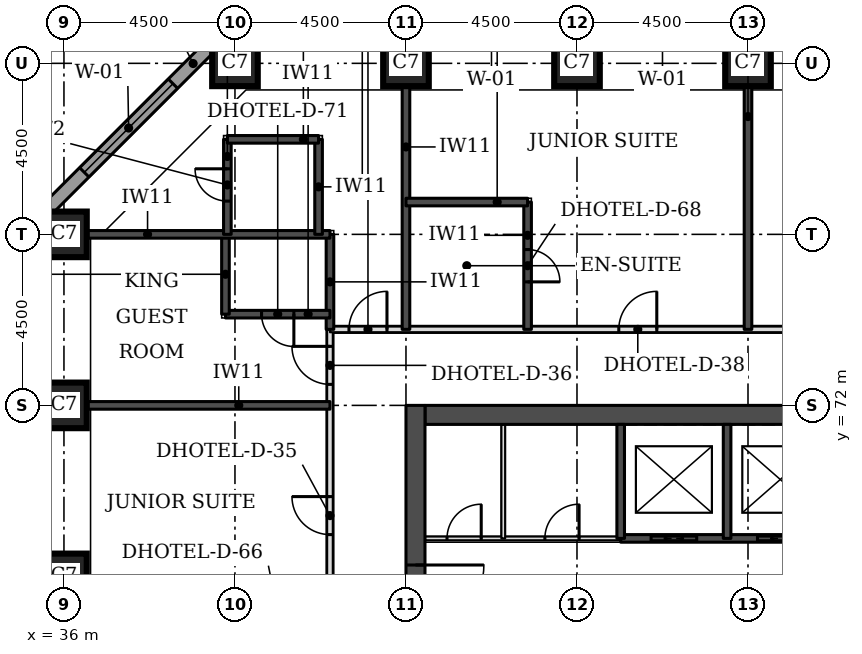
"""IFC4 building model, lengths in metres.
Left out: names, types, materials, properties, quantities, classifications, styles, units other than length and angle.
Written with IfcOpenShell. Run it as: python <this file> out.ifc"""

import sys

from ifc_helpers import new_model, si_unit, direction, frame, frame_2d, origin, origin_2d, place, context, subcontext, project, spatial, rectangle, extrude, element, fill, save


model = new_model("IFC4")
c1 = context("Model", 3, precision=1e-05, world=origin(), true_north=direction((0.0, 1.0)))
c2 = subcontext(c1, "Body", "Model", "MODEL_VIEW")
j1 = project(units=[si_unit("LENGTHUNIT", "METRE"), si_unit("PLANEANGLEUNIT", "RADIAN")], contexts=[c1])
p1 = place(None, origin())
s1 = spatial("IfcSite", under=j1, at=p1, CompositionType="ELEMENT")
p2 = place(p1, origin())
s2 = spatial("IfcBuilding", under=s1, at=p2, CompositionType="ELEMENT")
p3 = place(p2, frame((0.0, 0.0, 36.3)))
s3 = spatial("IfcBuildingStorey", under=s2, at=p3, CompositionType="ELEMENT", Elevation=36.3)
for number, where, z_axis, x_axis in (
    (1, (36.0, 67.5, 0.0), (0.0, 0.0, 1.0), (1.0, 0.0, 0.0)),
    (2, (36.0, 72.0, 0.0), (0.0, 0.0, 1.0), (1.0, 0.0, 0.0)),
    (3, (36.0, 76.5, 0.0), (0.0, 0.0, 1.0), (1.0, 0.0, 0.0)),
    (4, (40.5, 81.0, 0.0), (0.0, 0.0, 1.0), (1.0, 0.0, 0.0)),
    (5, (45.0, 81.0, 0.0), (0.0, 0.0, 1.0), (1.0, 0.0, 0.0)),
    (6, (49.5, 81.0, 0.0), (0.0, 0.0, 1.0), (1.0, 0.0, 0.0)),
    (7, (54.0, 81.0, 0.0), (0.0, 0.0, 1.0), (1.0, 0.0, 0.0)),
):
    element("IfcColumn", number, at=place(p3, frame(where, z_axis=z_axis, x_axis=x_axis)), inside=s3, PredefinedType="COLUMN", context=c2, shape_type="SweptSolid", body=[
        extrude(rectangle(XDim=1.2, YDim=1.2, at=origin_2d()), origin(), (0.0, 0.0, 1.0), 3.3),
    ])
p4 = place(p3, frame((45.5, 71.75, 0.0), z_axis=(0.0, 0.0, 1.0), x_axis=(1.0, 0.0, 0.0)))
e8 = element("IfcWall", 8, at=p4, inside=s3, PredefinedType="SHEAR", context=c2, shape_type="SweptSolid", body=[
    extrude(rectangle(XDim=21.5, YDim=0.5, at=frame_2d((10.75, 0.0))), origin(), (0.0, 0.0, 1.0), 3.3),
])
p5 = place(p3, frame((45.25, 49.5, 0.0), z_axis=(0.0, 0.0, 1.0), x_axis=(0.0, 1.0, 0.0)))
e9 = element("IfcWall", 9, at=p5, inside=s3, PredefinedType="SHEAR", context=c2, shape_type="SweptSolid", body=[
    extrude(rectangle(XDim=22.5, YDim=0.5, at=frame_2d((11.25, 0.0))), origin(), (0.0, 0.0, 1.0), 3.3),
])
p6 = place(p5, frame((4.2, 0.0, 0.0)))
e10 = element("IfcOpeningElement", 10, at=p6, cuts=e9, PredefinedType="OPENING", context=c2, shape_type="SweptSolid", body=[
    extrude(rectangle(XDim=1.8, YDim=2.1, at=frame_2d((0.9, 1.05))), frame((0.0, 0.26, 0.0), z_axis=(0.0, -1.0, 0.0), x_axis=(1.0, 0.0, 0.0)), (0.0, 0.0, 1.0), 0.52),
])
p7 = place(p5, frame((6.9, 0.0, 0.0)))
e11 = element("IfcOpeningElement", 11, at=p7, cuts=e9, PredefinedType="OPENING", context=c2, shape_type="SweptSolid", body=[
    extrude(rectangle(XDim=1.1, YDim=2.1, at=frame_2d((0.55, 1.05))), frame((0.0, 0.26, 0.0), z_axis=(0.0, -1.0, 0.0), x_axis=(1.0, 0.0, 0.0)), (0.0, 0.0, 1.0), 0.52),
])
p8 = place(p5, frame((13.6, 0.0, 0.0)))
e12 = element("IfcOpeningElement", 12, at=p8, cuts=e9, PredefinedType="OPENING", context=c2, shape_type="SweptSolid", body=[
    extrude(rectangle(XDim=1.1, YDim=2.1, at=frame_2d((0.55, 1.05))), frame((0.0, 0.26, 0.0), z_axis=(0.0, -1.0, 0.0), x_axis=(1.0, 0.0, 0.0)), (0.0, 0.0, 1.0), 0.52),
])
p9 = place(p5, frame((16.5, 0.0, 0.0)))
e13 = element("IfcOpeningElement", 13, at=p9, cuts=e9, PredefinedType="OPENING", context=c2, shape_type="SweptSolid", body=[
    extrude(rectangle(XDim=1.8, YDim=2.1, at=frame_2d((0.9, 1.05))), frame((0.0, 0.26, 0.0), z_axis=(0.0, -1.0, 0.0), x_axis=(1.0, 0.0, 0.0)), (0.0, 0.0, 1.0), 0.52),
])
p10 = place(p3, frame((40.23, 81.826, 0.0), z_axis=(0.0, 0.0, 1.0), x_axis=(-0.707106781187, -0.707106781187, 0.0)))
e14 = element("IfcWall", 14, at=p10, inside=s3, PredefinedType="STANDARD", context=c2, shape_type="SweptSolid", body=[
    extrude(rectangle(XDim=7.151, YDim=0.35, at=frame_2d((3.576, 0.0))), origin(), (0.0, 0.0, 1.0), 3.055),
])
p11 = place(p10, frame((1.926, 0.0, 0.8)))
e15 = element("IfcOpeningElement", 15, at=p11, cuts=e14, PredefinedType="OPENING", context=c2, shape_type="SweptSolid", body=[
    extrude(rectangle(XDim=3.3, YDim=1.5, at=frame_2d((1.65, 0.75))), frame((0.0, 0.185, 0.0), z_axis=(0.0, -1.0, 0.0), x_axis=(1.0, 0.0, 0.0)), (0.0, 0.0, 1.0), 0.37),
])
p12 = place(p3, frame((43.0, 57.35, 0.0), z_axis=(0.0, 0.0, 1.0), x_axis=(0.0, 1.0, 0.0)))
e16 = element("IfcWall", 16, at=p12, inside=s3, PredefinedType="PARTITIONING", context=c2, shape_type="SweptSolid", body=[
    extrude(rectangle(XDim=16.65, YDim=0.15, at=frame_2d((8.325, 0.0))), origin(), (0.0, 0.0, 1.0), 3.08),
])
p13 = place(p12, frame((11.25, 0.0, 0.0)))
e17 = element("IfcOpeningElement", 17, at=p13, cuts=e16, PredefinedType="OPENING", context=c2, shape_type="SweptSolid", body=[
    extrude(rectangle(XDim=1.0, YDim=2.1, at=frame_2d((0.5, 1.05))), frame((0.0, 0.085, 0.0), z_axis=(0.0, -1.0, 0.0), x_axis=(1.0, 0.0, 0.0)), (0.0, 0.0, 1.0), 0.17),
])
p14 = place(p12, frame((15.203, 0.0, 0.0)))
e18 = element("IfcOpeningElement", 18, at=p14, cuts=e16, PredefinedType="OPENING", context=c2, shape_type="SweptSolid", body=[
    extrude(rectangle(XDim=1.0, YDim=2.1, at=frame_2d((0.5, 1.05))), frame((0.0, 0.085, 0.0), z_axis=(0.0, -1.0, 0.0), x_axis=(1.0, 0.0, 0.0)), (0.0, 0.0, 1.0), 0.17),
])
p15 = place(p3, frame((43.0, 74.0, 0.0), z_axis=(0.0, 0.0, 1.0), x_axis=(1.0, 0.0, 0.0)))
e19 = element("IfcWall", 19, at=p15, inside=s3, PredefinedType="PARTITIONING", context=c2, shape_type="SweptSolid", body=[
    extrude(rectangle(XDim=26.5, YDim=0.15, at=frame_2d((13.25, 0.0))), origin(), (0.0, 0.0, 1.0), 3.08),
])
p16 = place(p15, frame((7.6, 0.0, 0.0)))
e20 = element("IfcOpeningElement", 20, at=p16, cuts=e19, PredefinedType="OPENING", context=c2, shape_type="SweptSolid", body=[
    extrude(rectangle(XDim=1.0, YDim=2.1, at=frame_2d((0.5, 1.05))), frame((0.0, 0.085, 0.0), z_axis=(0.0, -1.0, 0.0), x_axis=(1.0, 0.0, 0.0)), (0.0, 0.0, 1.0), 0.17),
])
p17 = place(p15, frame((13.65, 0.0, 0.0)))
e21 = element("IfcOpeningElement", 21, at=p17, cuts=e19, PredefinedType="OPENING", context=c2, shape_type="SweptSolid", body=[
    extrude(rectangle(XDim=1.0, YDim=2.1, at=frame_2d((0.5, 1.05))), frame((0.0, 0.085, 0.0), z_axis=(0.0, -1.0, 0.0), x_axis=(1.0, 0.0, 0.0)), (0.0, 0.0, 1.0), 0.17),
])
p18 = place(p15, frame((23.05, 0.0, 0.0)))
e22 = element("IfcOpeningElement", 22, at=p18, cuts=e19, PredefinedType="OPENING", context=c2, shape_type="SweptSolid", body=[
    extrude(rectangle(XDim=1.0, YDim=2.1, at=frame_2d((0.5, 1.05))), frame((0.0, 0.085, 0.0), z_axis=(0.0, -1.0, 0.0), x_axis=(1.0, 0.0, 0.0)), (0.0, 0.0, 1.0), 0.17),
])
p19 = place(p15, frame((0.5, 0.0, 0.0)))
e23 = element("IfcOpeningElement", 23, at=p19, cuts=e19, PredefinedType="OPENING", context=c2, shape_type="SweptSolid", body=[
    extrude(rectangle(XDim=1.0, YDim=2.1, at=frame_2d((0.5, 1.05))), frame((0.0, 0.085, 0.0), z_axis=(0.0, -1.0, 0.0), x_axis=(1.0, 0.0, 0.0)), (0.0, 0.0, 1.0), 0.17),
])
p20 = place(p15, frame((25.0, 0.0, 0.0)))
e24 = element("IfcOpeningElement", 24, at=p20, cuts=e19, PredefinedType="OPENING", context=c2, shape_type="SweptSolid", body=[
    extrude(rectangle(XDim=1.0, YDim=2.1, at=frame_2d((0.5, 1.05))), frame((0.0, 0.085, 0.0), z_axis=(0.0, -1.0, 0.0), x_axis=(1.0, 0.0, 0.0)), (0.0, 0.0, 1.0), 0.17),
])
p21 = place(p3, frame((36.6, 72.0, 0.0), z_axis=(0.0, 0.0, 1.0), x_axis=(1.0, 0.0, 0.0)))
e25 = element("IfcWall", 25, at=p21, inside=s3, PredefinedType="SOLIDWALL", context=c2, shape_type="SweptSolid", body=[
    extrude(rectangle(XDim=6.4, YDim=0.2, at=frame_2d((3.2, 0.0))), origin(), (0.0, 0.0, 1.0), 3.08),
])
p22 = place(p3, frame((43.0, 74.0, 0.0), z_axis=(0.0, 0.0, 1.0), x_axis=(0.0, 1.0, 0.0)))
e26 = element("IfcWall", 26, at=p22, inside=s3, PredefinedType="SOLIDWALL", context=c2, shape_type="SweptSolid", body=[
    extrude(rectangle(XDim=2.5, YDim=0.2, at=frame_2d((1.25, 0.0))), origin(), (0.0, 0.0, 1.0), 3.08),
])
p23 = place(p3, frame((45.0, 74.0, 0.0), z_axis=(0.0, 0.0, 1.0), x_axis=(0.0, 1.0, 0.0)))
e27 = element("IfcWall", 27, at=p23, inside=s3, PredefinedType="SOLIDWALL", context=c2, shape_type="SweptSolid", body=[
    extrude(rectangle(XDim=6.4, YDim=0.2, at=frame_2d((3.2, 0.0))), origin(), (0.0, 0.0, 1.0), 3.08),
])
p24 = place(p3, frame((48.2, 74.0, 0.0), z_axis=(0.0, 0.0, 1.0), x_axis=(0.0, 1.0, 0.0)))
e28 = element("IfcWall", 28, at=p24, inside=s3, PredefinedType="SOLIDWALL", context=c2, shape_type="SweptSolid", body=[
    extrude(rectangle(XDim=3.35, YDim=0.2, at=frame_2d((1.675, 0.0))), origin(), (0.0, 0.0, 1.0), 3.08),
])
p25 = place(p24, frame((1.25, 0.0, 0.0)))
e29 = element("IfcOpeningElement", 29, at=p25, cuts=e28, PredefinedType="OPENING", context=c2, shape_type="SweptSolid", body=[
    extrude(rectangle(XDim=0.85, YDim=2.1, at=frame_2d((0.425, 1.05))), frame((0.0, 0.11, 0.0), z_axis=(0.0, -1.0, 0.0), x_axis=(1.0, 0.0, 0.0)), (0.0, 0.0, 1.0), 0.22),
])
p26 = place(p3, frame((54.0, 74.0, 0.0), z_axis=(0.0, 0.0, 1.0), x_axis=(0.0, 1.0, 0.0)))
e30 = element("IfcWall", 30, at=p26, inside=s3, PredefinedType="SOLIDWALL", context=c2, shape_type="SweptSolid", body=[
    extrude(rectangle(XDim=6.4, YDim=0.2, at=frame_2d((3.2, 0.0))), origin(), (0.0, 0.0, 1.0), 3.08),
])
p27 = place(p3, frame((40.25, 74.4, 0.0), z_axis=(0.0, 0.0, 1.0), x_axis=(1.0, 0.0, 0.0)))
e31 = element("IfcWall", 31, at=p27, inside=s3, PredefinedType="SOLIDWALL", context=c2, shape_type="SweptSolid", body=[
    extrude(rectangle(XDim=2.75, YDim=0.2, at=frame_2d((1.375, 0.0))), origin(), (0.0, 0.0, 1.0), 3.08),
])
p28 = place(p27, frame((0.95, 0.0, 0.0)))
e32 = element("IfcOpeningElement", 32, at=p28, cuts=e31, PredefinedType="OPENING", context=c2, shape_type="SweptSolid", body=[
    extrude(rectangle(XDim=0.85, YDim=2.1, at=frame_2d((0.425, 1.05))), frame((0.0, 0.11, 0.0), z_axis=(0.0, -1.0, 0.0), x_axis=(1.0, 0.0, 0.0)), (0.0, 0.0, 1.0), 0.22),
])
p29 = place(p3, frame((40.25, 74.4, 0.0), z_axis=(0.0, 0.0, 1.0), x_axis=(0.0, 1.0, 0.0)))
e33 = element("IfcWall", 33, at=p29, inside=s3, PredefinedType="SOLIDWALL", context=c2, shape_type="SweptSolid", body=[
    extrude(rectangle(XDim=2.1, YDim=0.2, at=frame_2d((1.05, 0.0))), origin(), (0.0, 0.0, 1.0), 3.08),
])
p30 = place(p3, frame((36.6, 76.5, 0.0), z_axis=(0.0, 0.0, 1.0), x_axis=(1.0, 0.0, 0.0)))
e34 = element("IfcWall", 34, at=p30, inside=s3, PredefinedType="SOLIDWALL", context=c2, shape_type="SweptSolid", body=[
    extrude(rectangle(XDim=6.4, YDim=0.2, at=frame_2d((3.2, 0.0))), origin(), (0.0, 0.0, 1.0), 3.08),
])
p31 = place(p3, frame((40.3, 76.5, 0.0), z_axis=(0.0, 0.0, 1.0), x_axis=(0.0, 1.0, 0.0)))
e35 = element("IfcWall", 35, at=p31, inside=s3, PredefinedType="SOLIDWALL", context=c2, shape_type="SweptSolid", body=[
    extrude(rectangle(XDim=2.5, YDim=0.2, at=frame_2d((1.25, 0.0))), origin(), (0.0, 0.0, 1.0), 3.08),
])
p32 = place(p31, frame((0.875, 0.0, 0.0)))
e36 = element("IfcOpeningElement", 36, at=p32, cuts=e35, PredefinedType="OPENING", context=c2, shape_type="SweptSolid", body=[
    extrude(rectangle(XDim=0.85, YDim=2.1, at=frame_2d((0.425, 1.05))), frame((0.0, 0.11, 0.0), z_axis=(0.0, -1.0, 0.0), x_axis=(1.0, 0.0, 0.0)), (0.0, 0.0, 1.0), 0.22),
])
p33 = place(p3, frame((42.7, 76.5, 0.0), z_axis=(0.0, 0.0, 1.0), x_axis=(0.0, 1.0, 0.0)))
e37 = element("IfcWall", 37, at=p33, inside=s3, PredefinedType="SOLIDWALL", context=c2, shape_type="SweptSolid", body=[
    extrude(rectangle(XDim=2.5, YDim=0.2, at=frame_2d((1.25, 0.0))), origin(), (0.0, 0.0, 1.0), 3.08),
])
p34 = place(p3, frame((45.0, 77.35, 0.0), z_axis=(0.0, 0.0, 1.0), x_axis=(1.0, 0.0, 0.0)))
e38 = element("IfcWall", 38, at=p34, inside=s3, PredefinedType="SOLIDWALL", context=c2, shape_type="SweptSolid", body=[
    extrude(rectangle(XDim=3.2, YDim=0.2, at=frame_2d((1.6, 0.0))), origin(), (0.0, 0.0, 1.0), 3.08),
])
p35 = place(p3, frame((40.3, 79.0, 0.0), z_axis=(0.0, 0.0, 1.0), x_axis=(1.0, 0.0, 0.0)))
e39 = element("IfcWall", 39, at=p35, inside=s3, PredefinedType="SOLIDWALL", context=c2, shape_type="SweptSolid", body=[
    extrude(rectangle(XDim=2.4, YDim=0.2, at=frame_2d((1.2, 0.0))), origin(), (0.0, 0.0, 1.0), 3.08),
])
p36 = place(p3, frame((45.5, 68.5, 0.0), z_axis=(0.0, 0.0, 1.0), x_axis=(1.0, 0.0, 0.0)))
e40 = element("IfcWall", 40, at=p36, inside=s3, PredefinedType="PARTITIONING", context=c2, shape_type="SweptSolid", body=[
    extrude(rectangle(XDim=5.15, YDim=0.1, at=frame_2d((2.575, 0.0))), origin(), (0.0, 0.0, 1.0), 3.08),
])
p37 = place(p36, frame((0.58, 0.0, 0.0)))
e41 = element("IfcOpeningElement", 41, at=p37, cuts=e40, PredefinedType="OPENING", context=c2, shape_type="SweptSolid", body=[
    extrude(rectangle(XDim=0.9, YDim=2.1, at=frame_2d((0.45, 1.05))), frame((0.0, 0.06, 0.0), z_axis=(0.0, -1.0, 0.0), x_axis=(1.0, 0.0, 0.0)), (0.0, 0.0, 1.0), 0.12),
])
p38 = place(p36, frame((3.155, 0.0, 0.0)))
e42 = element("IfcOpeningElement", 42, at=p38, cuts=e40, PredefinedType="OPENING", context=c2, shape_type="SweptSolid", body=[
    extrude(rectangle(XDim=0.9, YDim=2.1, at=frame_2d((0.45, 1.05))), frame((0.0, 0.06, 0.0), z_axis=(0.0, -1.0, 0.0), x_axis=(1.0, 0.0, 0.0)), (0.0, 0.0, 1.0), 0.12),
])
p39 = place(p3, frame((50.65, 68.5, 0.0), z_axis=(0.0, 0.0, 1.0), x_axis=(1.0, 0.0, 0.0)))
e43 = element("IfcWall", 43, at=p39, inside=s3, PredefinedType="SOLIDWALL", context=c2, shape_type="SweptSolid", body=[
    extrude(rectangle(XDim=11.2, YDim=0.2, at=frame_2d((5.6, 0.0))), origin(), (0.0, 0.0, 1.0), 3.08),
])
p40 = place(p39, frame((0.8, 0.0, 0.0)))
e44 = element("IfcOpeningElement", 44, at=p40, cuts=e43, PredefinedType="OPENING", context=c2, shape_type="SweptSolid", body=[
    extrude(rectangle(XDim=1.2, YDim=2.1, at=frame_2d((0.6, 1.05))), frame((0.0, 0.11, 0.0), z_axis=(0.0, -1.0, 0.0), x_axis=(1.0, 0.0, 0.0)), (0.0, 0.0, 1.0), 0.22),
])
p41 = place(p39, frame((3.6, 0.0, 0.0)))
e45 = element("IfcOpeningElement", 45, at=p41, cuts=e43, PredefinedType="OPENING", context=c2, shape_type="SweptSolid", body=[
    extrude(rectangle(XDim=1.2, YDim=2.1, at=frame_2d((0.6, 1.05))), frame((0.0, 0.11, 0.0), z_axis=(0.0, -1.0, 0.0), x_axis=(1.0, 0.0, 0.0)), (0.0, 0.0, 1.0), 0.22),
])
p42 = place(p39, frame((6.4, 0.0, 0.0)))
e46 = element("IfcOpeningElement", 46, at=p42, cuts=e43, PredefinedType="OPENING", context=c2, shape_type="SweptSolid", body=[
    extrude(rectangle(XDim=1.2, YDim=2.1, at=frame_2d((0.6, 1.05))), frame((0.0, 0.11, 0.0), z_axis=(0.0, -1.0, 0.0), x_axis=(1.0, 0.0, 0.0)), (0.0, 0.0, 1.0), 0.22),
])
p43 = place(p39, frame((9.2, 0.0, 0.0)))
e47 = element("IfcOpeningElement", 47, at=p43, cuts=e43, PredefinedType="OPENING", context=c2, shape_type="SweptSolid", body=[
    extrude(rectangle(XDim=1.2, YDim=2.1, at=frame_2d((0.6, 1.05))), frame((0.0, 0.11, 0.0), z_axis=(0.0, -1.0, 0.0), x_axis=(1.0, 0.0, 0.0)), (0.0, 0.0, 1.0), 0.22),
])
p44 = place(p3, frame((47.56, 68.5, 0.0), z_axis=(0.0, 0.0, 1.0), x_axis=(0.0, 1.0, 0.0)))
e48 = element("IfcWall", 48, at=p44, inside=s3, PredefinedType="PARTITIONING", context=c2, shape_type="SweptSolid", body=[
    extrude(rectangle(XDim=3.0, YDim=0.1, at=frame_2d((1.5, 0.0))), origin(), (0.0, 0.0, 1.0), 3.08),
])
for number, where, z_axis, x_axis in (
    (49, (50.65, 68.5, 0.0), (0.0, 0.0, 1.0), (0.0, 1.0, 0.0)),
    (50, (53.45, 68.5, 0.0), (0.0, 0.0, 1.0), (0.0, 1.0, 0.0)),
):
    element("IfcWall", number, at=place(p3, frame(where, z_axis=z_axis, x_axis=x_axis)), inside=s3, PredefinedType="SOLIDWALL", context=c2, shape_type="SweptSolid", body=[
        extrude(rectangle(XDim=3.0, YDim=0.2, at=frame_2d((1.5, 0.0))), origin(), (0.0, 0.0, 1.0), 3.08),
    ])
p45 = place(p11, origin())
e51 = element("IfcWindow", 51, at=p45, inside=s3, PartitioningType="SINGLE_PANEL", PredefinedType="WINDOW", context=c2, shape_type="SweptSolid", body=[
    extrude(rectangle(XDim=3.3, YDim=1.5, at=frame_2d((1.65, 0.75))), frame((0.0, 0.085, 0.0), z_axis=(0.0, -1.0, 0.0), x_axis=(1.0, 0.0, 0.0)), (0.0, 0.0, 1.0), 0.06),
])
fill(e15, e51)
p46 = place(p13, origin())
e52 = element("IfcDoor", 52, at=p46, inside=s3, OperationType="SINGLE_SWING_RIGHT", PredefinedType="DOOR", context=c2, shape_type="SweptSolid", body=[
    extrude(rectangle(XDim=1.0, YDim=2.1, at=frame_2d((0.5, 1.05))), frame((0.0, 0.025, 0.0), z_axis=(0.0, -1.0, 0.0), x_axis=(1.0, 0.0, 0.0)), (0.0, 0.0, 1.0), 0.05),
])
fill(e17, e52)
p47 = place(p14, origin())
e53 = element("IfcDoor", 53, at=p47, inside=s3, OperationType="SINGLE_SWING_RIGHT", PredefinedType="DOOR", context=c2, shape_type="SweptSolid", body=[
    extrude(rectangle(XDim=1.0, YDim=2.1, at=frame_2d((0.5, 1.05))), frame((0.0, 0.025, 0.0), z_axis=(0.0, -1.0, 0.0), x_axis=(1.0, 0.0, 0.0)), (0.0, 0.0, 1.0), 0.05),
])
fill(e18, e53)
p48 = place(p28, frame((0.85, 0.0, 0.0), z_axis=(0.0, 0.0, 1.0), x_axis=(-1.0, 0.0, 0.0)))
e54 = element("IfcDoor", 54, at=p48, inside=s3, OperationType="SINGLE_SWING_LEFT", PredefinedType="DOOR", context=c2, shape_type="SweptSolid", body=[
    extrude(rectangle(XDim=0.85, YDim=2.1, at=frame_2d((0.425, 1.05))), frame((0.0, 0.025, 0.0), z_axis=(0.0, -1.0, 0.0), x_axis=(1.0, 0.0, 0.0)), (0.0, 0.0, 1.0), 0.05),
])
fill(e32, e54)
p49 = place(p16, origin())
e55 = element("IfcDoor", 55, at=p49, inside=s3, OperationType="SINGLE_SWING_RIGHT", PredefinedType="DOOR", context=c2, shape_type="SweptSolid", body=[
    extrude(rectangle(XDim=1.0, YDim=2.1, at=frame_2d((0.5, 1.05))), frame((0.0, 0.025, 0.0), z_axis=(0.0, -1.0, 0.0), x_axis=(1.0, 0.0, 0.0)), (0.0, 0.0, 1.0), 0.05),
])
fill(e20, e55)
p50 = place(p25, frame((0.85, 0.0, 0.0), z_axis=(0.0, 0.0, 1.0), x_axis=(-1.0, 0.0, 0.0)))
e56 = element("IfcDoor", 56, at=p50, inside=s3, OperationType="SINGLE_SWING_RIGHT", PredefinedType="DOOR", context=c2, shape_type="SweptSolid", body=[
    extrude(rectangle(XDim=0.85, YDim=2.1, at=frame_2d((0.425, 1.05))), frame((0.0, 0.025, 0.0), z_axis=(0.0, -1.0, 0.0), x_axis=(1.0, 0.0, 0.0)), (0.0, 0.0, 1.0), 0.05),
])
fill(e29, e56)
p51 = place(p19, origin())
e57 = element("IfcDoor", 57, at=p51, inside=s3, OperationType="SINGLE_SWING_RIGHT", PredefinedType="DOOR", context=c2, shape_type="SweptSolid", body=[
    extrude(rectangle(XDim=1.0, YDim=2.1, at=frame_2d((0.5, 1.05))), frame((0.0, 0.025, 0.0), z_axis=(0.0, -1.0, 0.0), x_axis=(1.0, 0.0, 0.0)), (0.0, 0.0, 1.0), 0.05),
])
fill(e23, e57)
p52 = place(p32, origin())
e58 = element("IfcDoor", 58, at=p52, inside=s3, OperationType="SINGLE_SWING_RIGHT", PredefinedType="DOOR", context=c2, shape_type="SweptSolid", body=[
    extrude(rectangle(XDim=0.85, YDim=2.1, at=frame_2d((0.425, 1.05))), frame((0.0, 0.025, 0.0), z_axis=(0.0, -1.0, 0.0), x_axis=(1.0, 0.0, 0.0)), (0.0, 0.0, 1.0), 0.05),
])
fill(e36, e58)
p53 = place(p40, origin())
e59 = element("IfcDoor", 59, at=p53, inside=s3, OperationType="DOUBLE_DOOR_SLIDING", PredefinedType="DOOR", context=c2, shape_type="SweptSolid", body=[
    extrude(rectangle(XDim=1.2, YDim=2.1, at=frame_2d((0.6, 1.05))), frame((0.0, 0.025, 0.0), z_axis=(0.0, -1.0, 0.0), x_axis=(1.0, 0.0, 0.0)), (0.0, 0.0, 1.0), 0.05),
])
fill(e44, e59)
p54 = place(p41, origin())
e60 = element("IfcDoor", 60, at=p54, inside=s3, OperationType="DOUBLE_DOOR_SLIDING", PredefinedType="DOOR", context=c2, shape_type="SweptSolid", body=[
    extrude(rectangle(XDim=1.2, YDim=2.1, at=frame_2d((0.6, 1.05))), frame((0.0, 0.025, 0.0), z_axis=(0.0, -1.0, 0.0), x_axis=(1.0, 0.0, 0.0)), (0.0, 0.0, 1.0), 0.05),
])
fill(e45, e60)
p55 = place(p9, frame((1.8, 0.0, 0.0), z_axis=(0.0, 0.0, 1.0), x_axis=(-1.0, 0.0, 0.0)))
e61 = element("IfcDoor", 61, at=p55, inside=s3, OperationType="SINGLE_SWING_LEFT", PredefinedType="DOOR", context=c2, shape_type="SweptSolid", body=[
    extrude(rectangle(XDim=1.8, YDim=2.1, at=frame_2d((0.9, 1.05))), frame((0.0, 0.025, 0.0), z_axis=(0.0, -1.0, 0.0), x_axis=(1.0, 0.0, 0.0)), (0.0, 0.0, 1.0), 0.05),
])
fill(e13, e61)
p56 = place(p37, origin())
e62 = element("IfcDoor", 62, at=p56, inside=s3, OperationType="SINGLE_SWING_RIGHT", PredefinedType="DOOR", context=c2, shape_type="SweptSolid", body=[
    extrude(rectangle(XDim=0.9, YDim=2.1, at=frame_2d((0.45, 1.05))), frame((0.0, 0.025, 0.0), z_axis=(0.0, -1.0, 0.0), x_axis=(1.0, 0.0, 0.0)), (0.0, 0.0, 1.0), 0.05),
])
fill(e41, e62)
p57 = place(p38, origin())
e63 = element("IfcDoor", 63, at=p57, inside=s3, OperationType="SINGLE_SWING_RIGHT", PredefinedType="DOOR", context=c2, shape_type="SweptSolid", body=[
    extrude(rectangle(XDim=0.9, YDim=2.1, at=frame_2d((0.45, 1.05))), frame((0.0, 0.025, 0.0), z_axis=(0.0, -1.0, 0.0), x_axis=(1.0, 0.0, 0.0)), (0.0, 0.0, 1.0), 0.05),
])
fill(e42, e63)
save(model, sys.argv[1])
